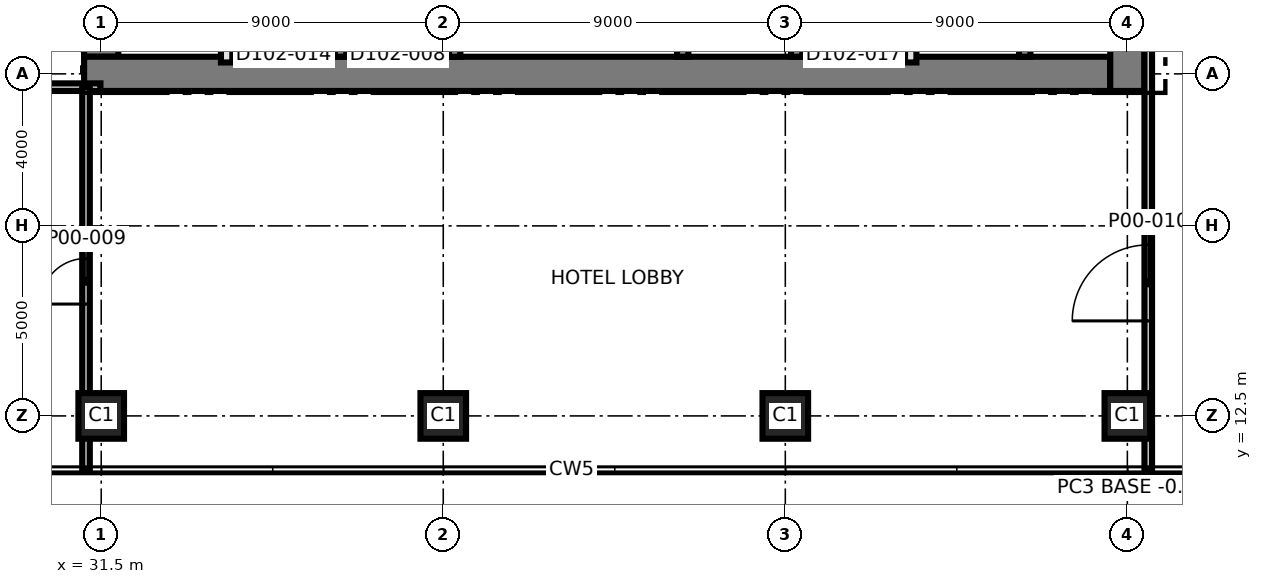
"""IFC4 building model, lengths in metres.
Left out: names, types, materials, properties, quantities, classifications, styles, units other than length and angle.
Written with IfcOpenShell. Run it as: python <this file> out.ifc"""

import sys

from ifc_helpers import new_model, si_unit, direction, frame, frame_2d, origin, origin_2d, place, context, subcontext, project, spatial, rectangle, extrude, element, fill, save


model = new_model("IFC4")
c1 = context("Model", 3, precision=1e-05, world=origin(), true_north=direction((0.0, 1.0)))
c2 = subcontext(c1, "Body", "Model", "MODEL_VIEW")
j1 = project(units=[si_unit("LENGTHUNIT", "METRE"), si_unit("PLANEANGLEUNIT", "RADIAN")], contexts=[c1])
p1 = place(None, origin())
s1 = spatial("IfcSite", under=j1, at=p1, CompositionType="ELEMENT")
p2 = place(p1, origin())
s2 = spatial("IfcBuilding", under=s1, at=p2, CompositionType="ELEMENT")
p3 = place(p2, origin())
s3 = spatial("IfcBuildingStorey", under=s2, at=p3, CompositionType="ELEMENT", Elevation=0.0)
p4 = place(p3, frame((31.5, 21.95, 0.0), z_axis=(0.0, 0.0, 1.0), x_axis=(0.0, 1.0, 0.0)))
e1 = element("IfcWall", 1, at=p4, inside=s3, PredefinedType="SHEAR", context=c2, shape_type="SweptSolid", body=[
    extrude(rectangle(XDim=17.1, YDim=0.9, at=frame_2d((8.55, 0.0))), origin(), (0.0, 0.0, 1.0), 8.0),
])
p5 = place(p3, frame((31.05, 21.5, 0.0), z_axis=(0.0, 0.0, 1.0), x_axis=(1.0, 0.0, 0.0)))
e2 = element("IfcWall", 2, at=p5, inside=s3, PredefinedType="SHEAR", context=c2, shape_type="SweptSolid", body=[
    extrude(rectangle(XDim=27.0, YDim=0.9, at=frame_2d((13.5, 0.0))), origin(), (0.0, 0.0, 1.0), 8.0),
])
p6 = place(p3, frame((58.5, 21.05, 0.0), z_axis=(0.0, 0.0, 1.0), x_axis=(0.0, 1.0, 0.0)))
e3 = element("IfcWall", 3, at=p6, inside=s3, PredefinedType="SHEAR", context=c2, shape_type="SweptSolid", body=[
    extrude(rectangle(XDim=18.9, YDim=0.9, at=frame_2d((9.45, 0.0))), origin(), (0.0, 0.0, 1.0), 8.0),
])
p7 = place(p3, frame((37.8, 21.95, 0.0), z_axis=(0.0, 0.0, 1.0), x_axis=(0.0, 1.0, 0.0)))
e4 = element("IfcWall", 4, at=p7, inside=s3, PredefinedType="SHEAR", context=c2, shape_type="SweptSolid", body=[
    extrude(rectangle(XDim=8.55, YDim=0.3, at=frame_2d((4.275, 0.0))), origin(), (0.0, 0.0, 1.0), 8.0),
])
p8 = place(p7, frame((3.7, 0.0, 0.0)))
e5 = element("IfcOpeningElement", 5, at=p8, cuts=e4, PredefinedType="OPENING", context=c2, shape_type="SweptSolid", body=[
    extrude(rectangle(XDim=1.5, YDim=2.1, at=frame_2d((0.75, 1.05))), frame((0.0, 0.16, 0.0), z_axis=(0.0, -1.0, 0.0), x_axis=(1.0, 0.0, 0.0)), (0.0, 0.0, 1.0), 0.32),
])
p9 = place(p3, frame((40.8, 21.95, 0.0), z_axis=(0.0, 0.0, 1.0), x_axis=(0.0, 1.0, 0.0)))
e6 = element("IfcWall", 6, at=p9, inside=s3, PredefinedType="SHEAR", context=c2, shape_type="SweptSolid", body=[
    extrude(rectangle(XDim=8.55, YDim=0.3, at=frame_2d((4.275, 0.0))), origin(), (0.0, 0.0, 1.0), 8.0),
])
p10 = place(p9, frame((4.138, 0.0, 0.0)))
e7 = element("IfcOpeningElement", 7, at=p10, cuts=e6, PredefinedType="OPENING", context=c2, shape_type="SweptSolid", body=[
    extrude(rectangle(XDim=1.0, YDim=2.1, at=frame_2d((0.5, 1.05))), frame((0.0, 0.16, 0.0), z_axis=(0.0, -1.0, 0.0), x_axis=(1.0, 0.0, 0.0)), (0.0, 0.0, 1.0), 0.32),
])
p11 = place(p3, frame((46.8, 21.95, 0.0), z_axis=(0.0, 0.0, 1.0), x_axis=(0.0, 1.0, 0.0)))
e8 = element("IfcWall", 8, at=p11, inside=s3, PredefinedType="SHEAR", context=c2, shape_type="SweptSolid", body=[
    extrude(rectangle(XDim=8.55, YDim=0.3, at=frame_2d((4.275, 0.0))), origin(), (0.0, 0.0, 1.0), 8.0),
])
p12 = place(p3, frame((49.8, 21.95, 0.0), z_axis=(0.0, 0.0, 1.0), x_axis=(0.0, 1.0, 0.0)))
e9 = element("IfcWall", 9, at=p12, inside=s3, PredefinedType="SHEAR", context=c2, shape_type="SweptSolid", body=[
    extrude(rectangle(XDim=8.55, YDim=0.3, at=frame_2d((4.275, 0.0))), origin(), (0.0, 0.0, 1.0), 8.0),
])
p13 = place(p12, frame((3.7, 0.0, 0.0)))
e10 = element("IfcOpeningElement", 10, at=p13, cuts=e9, PredefinedType="OPENING", context=c2, shape_type="SweptSolid", body=[
    extrude(rectangle(XDim=1.5, YDim=2.1, at=frame_2d((0.75, 1.05))), frame((0.0, 0.16, 0.0), z_axis=(0.0, -1.0, 0.0), x_axis=(1.0, 0.0, 0.0)), (0.0, 0.0, 1.0), 0.32),
])
p14 = place(p3, frame((55.8, 21.95, 0.0), z_axis=(0.0, 0.0, 1.0), x_axis=(0.0, 1.0, 0.0)))
e11 = element("IfcWall", 11, at=p14, inside=s3, PredefinedType="SHEAR", context=c2, shape_type="SweptSolid", body=[
    extrude(rectangle(XDim=8.55, YDim=0.3, at=frame_2d((4.275, 0.0))), origin(), (0.0, 0.0, 1.0), 8.0),
])
for number, where, z_axis, x_axis in (
    (12, (31.5, 12.5, 0.0), (0.0, 0.0, 1.0), (1.0, 0.0, 0.0)),
    (13, (40.5, 12.5, 0.0), (0.0, 0.0, 1.0), (1.0, 0.0, 0.0)),
    (14, (49.5, 12.5, 0.0), (0.0, 0.0, 1.0), (1.0, 0.0, 0.0)),
    (15, (58.5, 12.5, 0.0), (0.0, 0.0, 1.0), (1.0, 0.0, 0.0)),
):
    element("IfcColumn", number, at=place(p3, frame(where, z_axis=z_axis, x_axis=x_axis)), inside=s3, PredefinedType="COLUMN", context=c2, shape_type="SweptSolid", body=[
        extrude(rectangle(XDim=1.2, YDim=1.2, at=origin_2d()), origin(), (0.0, 0.0, 1.0), 8.0),
    ])
for number, where, z_axis, x_axis in (
    (16, (34.8, 21.8, 0.0), (0.0, 0.0, 1.0), (0.0, 1.0, 0.0)),
    (17, (52.8, 21.8, 0.0), (0.0, 0.0, 1.0), (0.0, 1.0, 0.0)),
):
    element("IfcWall", number, at=place(p3, frame(where, z_axis=z_axis, x_axis=x_axis)), inside=s3, PredefinedType="SOLIDWALL", context=c2, shape_type="SweptSolid", body=[
        extrude(rectangle(XDim=3.1, YDim=0.3, at=frame_2d((1.55, 0.0))), origin(), (0.0, 0.0, 1.0), 7.7),
    ])
p15 = place(p3, frame((21.07, 21.15, 0.0), z_axis=(0.0, 0.0, 1.0), x_axis=(1.0, 0.0, 0.0)))
e18 = element("IfcWall", 18, at=p15, inside=s3, PredefinedType="PARTITIONING", context=c2, shape_type="SweptSolid", body=[
    extrude(rectangle(XDim=10.41, YDim=0.2, at=frame_2d((5.205, 0.0))), origin(), (0.0, 0.0, 1.0), 6.8),
])
p16 = place(p3, frame((31.1, 11.07, 0.0), z_axis=(0.0, 0.0, 1.0), x_axis=(0.0, 1.0, 0.0)))
e19 = element("IfcWall", 19, at=p16, inside=s3, PredefinedType="PARTITIONING", context=c2, shape_type="SweptSolid", body=[
    extrude(rectangle(XDim=10.08, YDim=0.2, at=frame_2d((5.04, 0.0))), origin(), (0.0, 0.0, 1.0), 6.8),
])
p17 = place(p16, frame((4.373, 0.0, 0.0)))
e20 = element("IfcOpeningElement", 20, at=p17, cuts=e19, PredefinedType="OPENING", context=c2, shape_type="SweptSolid", body=[
    extrude(rectangle(XDim=1.2, YDim=2.1, at=frame_2d((0.6, 1.05))), frame((0.0, 0.11, 0.0), z_axis=(0.0, -1.0, 0.0), x_axis=(1.0, 0.0, 0.0)), (0.0, 0.0, 1.0), 0.22),
])
p18 = place(p3, frame((59.05, 11.07, 0.0), z_axis=(0.0, 0.0, 1.0), x_axis=(0.0, 1.0, 0.0)))
e21 = element("IfcWall", 21, at=p18, inside=s3, PredefinedType="PARTITIONING", context=c2, shape_type="SweptSolid", body=[
    extrude(rectangle(XDim=19.88, YDim=0.2, at=frame_2d((9.94, 0.0))), origin(), (0.0, 0.0, 1.0), 6.8),
])
p19 = place(p18, frame((3.93, 0.0, 0.0)))
e22 = element("IfcOpeningElement", 22, at=p19, cuts=e21, PredefinedType="OPENING", context=c2, shape_type="SweptSolid", body=[
    extrude(rectangle(XDim=2.0, YDim=2.1, at=frame_2d((1.0, 1.05))), frame((0.0, 0.11, 0.0), z_axis=(0.0, -1.0, 0.0), x_axis=(1.0, 0.0, 0.0)), (0.0, 0.0, 1.0), 0.22),
])
p20 = place(p17, origin())
e23 = element("IfcDoor", 23, at=p20, inside=s3, OperationType="SINGLE_SWING_LEFT", PredefinedType="DOOR", context=c2, shape_type="SweptSolid", body=[
    extrude(rectangle(XDim=1.2, YDim=2.1, at=frame_2d((0.6, 1.05))), frame((0.0, 0.025, 0.0), z_axis=(0.0, -1.0, 0.0), x_axis=(1.0, 0.0, 0.0)), (0.0, 0.0, 1.0), 0.05),
])
fill(e20, e23)
p21 = place(p19, origin())
e24 = element("IfcDoor", 24, at=p21, inside=s3, OperationType="SINGLE_SWING_RIGHT", PredefinedType="DOOR", context=c2, shape_type="SweptSolid", body=[
    extrude(rectangle(XDim=2.0, YDim=2.1, at=frame_2d((1.0, 1.05))), frame((0.0, 0.025, 0.0), z_axis=(0.0, -1.0, 0.0), x_axis=(1.0, 0.0, 0.0)), (0.0, 0.0, 1.0), 0.05),
])
fill(e22, e24)
save(model, sys.argv[1])
